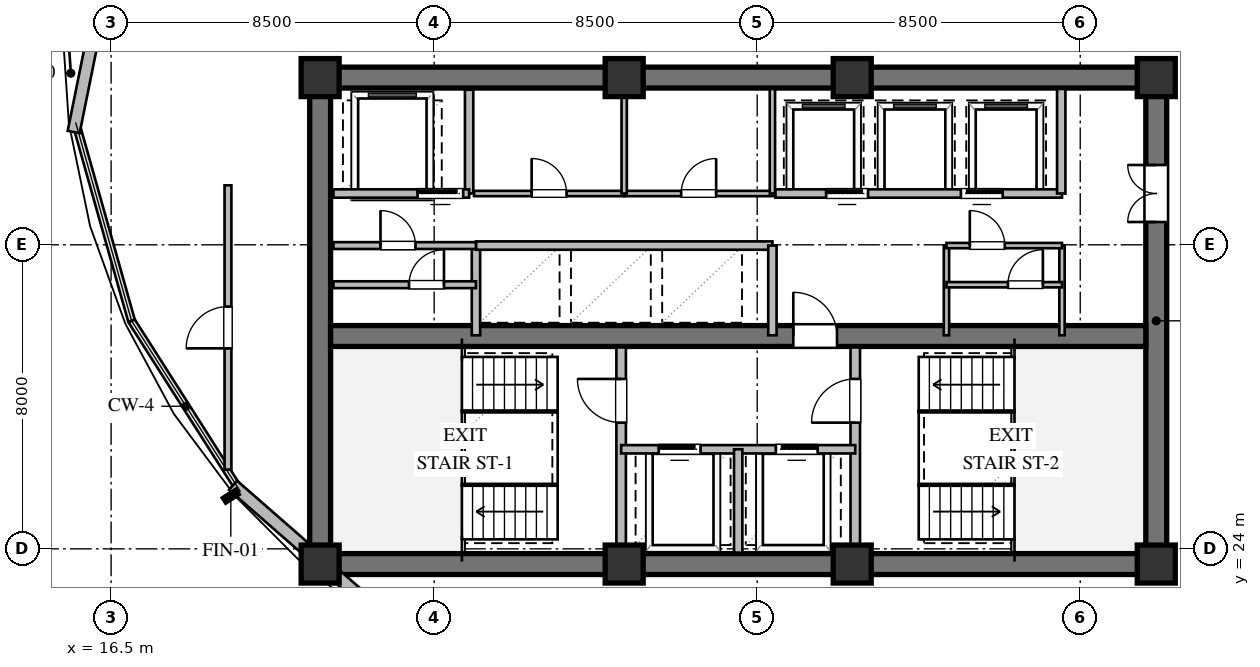
"""IFC4 building model, lengths in metres.
Left out: names, types, materials, properties, quantities, classifications, styles, units other than length and angle.
Written with IfcOpenShell. Run it as: python <this file> out.ifc"""

import sys

from ifc_helpers import new_model, si_unit, direction, frame, frame_2d, origin, origin_2d, place, context, subcontext, project, spatial, rectangle, extrude, element, fill, save


model = new_model("IFC4")
c1 = context("Model", 3, precision=1e-05, world=origin(), true_north=direction((0.0, 1.0)))
c2 = subcontext(c1, "Body", "Model", "MODEL_VIEW")
j1 = project(units=[si_unit("LENGTHUNIT", "METRE"), si_unit("PLANEANGLEUNIT", "RADIAN")], contexts=[c1])
p1 = place(None, origin())
s1 = spatial("IfcSite", under=j1, at=p1, CompositionType="ELEMENT")
p2 = place(p1, origin())
s2 = spatial("IfcBuilding", under=s1, at=p2, CompositionType="ELEMENT")
p3 = place(p2, frame((0.0, 0.0, 109.8)))
s3 = spatial("IfcBuildingStorey", under=s2, at=p3, CompositionType="ELEMENT", Elevation=109.8)
for number, where, z_axis, x_axis in (
    (1, (21.725, 23.6, 0.0), (0.0, 0.0, 1.0), (1.0, 0.0, 0.0)),
    (2, (21.725, 36.4, 0.0), (0.0, 0.0, 1.0), (1.0, 0.0, 0.0)),
):
    element("IfcWall", number, at=place(p3, frame(where, z_axis=z_axis, x_axis=x_axis)), inside=s3, PredefinedType="SHEAR", context=c2, shape_type="SweptSolid", body=[
        extrude(rectangle(XDim=22.55, YDim=0.55, at=frame_2d((11.275, 0.0))), origin(), (0.0, 0.0, 1.0), 3.36),
    ])
p4 = place(p3, frame((22.0, 23.875, 0.0), z_axis=(0.0, 0.0, 1.0), x_axis=(0.0, 1.0, 0.0)))
e3 = element("IfcWall", 3, at=p4, inside=s3, PredefinedType="SHEAR", context=c2, shape_type="SweptSolid", body=[
    extrude(rectangle(XDim=12.25, YDim=0.55, at=frame_2d((6.125, 0.0))), origin(), (0.0, 0.0, 1.0), 3.36),
])
p5 = place(p3, frame((44.0, 23.875, 0.0), z_axis=(0.0, 0.0, 1.0), x_axis=(0.0, 1.0, 0.0)))
e4 = element("IfcWall", 4, at=p5, inside=s3, PredefinedType="SHEAR", context=c2, shape_type="SweptSolid", body=[
    extrude(rectangle(XDim=12.25, YDim=0.55, at=frame_2d((6.125, 0.0))), origin(), (0.0, 0.0, 1.0), 3.36),
])
p6 = place(p5, frame((8.725, 0.0, 0.0)))
e5 = element("IfcOpeningElement", 5, at=p6, cuts=e4, PredefinedType="OPENING", context=c2, shape_type="SweptSolid", body=[
    extrude(rectangle(XDim=1.5, YDim=2.15, at=frame_2d((0.75, 1.075))), frame((0.0, 0.285, 0.0), z_axis=(0.0, -1.0, 0.0), x_axis=(1.0, 0.0, 0.0)), (0.0, 0.0, 1.0), 0.57),
])
p7 = place(p3, frame((22.275, 29.6, 0.0), z_axis=(0.0, 0.0, 1.0), x_axis=(1.0, 0.0, 0.0)))
e6 = element("IfcWall", 6, at=p7, inside=s3, PredefinedType="SHEAR", context=c2, shape_type="SweptSolid", body=[
    extrude(rectangle(XDim=21.45, YDim=0.55, at=frame_2d((10.725, 0.0))), origin(), (0.0, 0.0, 1.0), 3.36),
])
p8 = place(p7, frame((12.175, 0.0, 0.0)))
e7 = element("IfcOpeningElement", 7, at=p8, cuts=e6, PredefinedType="OPENING", context=c2, shape_type="SweptSolid", body=[
    extrude(rectangle(XDim=1.15, YDim=2.1, at=frame_2d((0.575, 1.05))), frame((0.0, 0.285, 0.0), z_axis=(0.0, -1.0, 0.0), x_axis=(1.0, 0.0, 0.0)), (0.0, 0.0, 1.0), 0.57),
])
for number, where, z_axis, x_axis in (
    (8, (22.0, 23.6, 0.0), (0.0, 0.0, 1.0), (1.0, 0.0, 0.0)),
    (9, (30.0, 23.6, 0.0), (0.0, 0.0, 1.0), (1.0, 0.0, 0.0)),
    (10, (36.0, 23.6, 0.0), (0.0, 0.0, 1.0), (1.0, 0.0, 0.0)),
    (11, (44.0, 23.6, 0.0), (0.0, 0.0, 1.0), (1.0, 0.0, 0.0)),
    (12, (44.0, 36.4, 0.0), (0.0, 0.0, 1.0), (1.0, 0.0, 0.0)),
    (13, (36.0, 36.4, 0.0), (0.0, 0.0, 1.0), (1.0, 0.0, 0.0)),
    (14, (30.0, 36.4, 0.0), (0.0, 0.0, 1.0), (1.0, 0.0, 0.0)),
    (15, (22.0, 36.4, 0.0), (0.0, 0.0, 1.0), (1.0, 0.0, 0.0)),
):
    element("IfcColumn", number, at=place(p3, frame(where, z_axis=z_axis, x_axis=x_axis)), inside=s3, PredefinedType="COLUMN", context=c2, shape_type="SweptSolid", body=[
        extrude(rectangle(XDim=1.0, YDim=1.0, at=origin_2d()), origin(), (0.0, 0.0, 1.0), 3.6),
    ])
p9 = place(p3, frame((24.225, 21.727, 0.0), z_axis=(0.0, 0.0, 1.0), x_axis=(-0.753105964003, 0.657899237713, 0.0)))
e16 = element("IfcWall", 16, at=p9, inside=s3, PredefinedType="STANDARD", context=c2, shape_type="SweptSolid", body=[
    extrude(rectangle(XDim=5.998, YDim=0.32, at=frame_2d((2.999, 0.0))), origin(), (0.0, 0.0, 1.0), 2.35),
])
p10 = place(p3, frame((15.514, 34.967, 0.0), z_axis=(0.0, 0.0, 1.0), x_axis=(0.198370893133, 0.980127026848, 0.0)))
e17 = element("IfcWall", 17, at=p10, inside=s3, PredefinedType="STANDARD", context=c2, shape_type="SweptSolid", body=[
    extrude(rectangle(XDim=14.469, YDim=0.32, at=frame_2d((7.234, 0.0))), origin(), (0.0, 0.0, 1.0), 3.36),
])
p11 = place(p3, frame((29.92, 23.9, 0.0), z_axis=(0.0, 0.0, 1.0), x_axis=(0.0, 1.0, 0.0)))
e18 = element("IfcWall", 18, at=p11, inside=s3, PredefinedType="SOLIDWALL", context=c2, shape_type="SweptSolid", body=[
    extrude(rectangle(XDim=5.4, YDim=0.25, at=frame_2d((2.7, 0.0))), origin(), (0.0, 0.0, 1.0), 2.806),
])
p12 = place(p11, frame((3.421, 0.0, 0.0)))
e19 = element("IfcOpeningElement", 19, at=p12, cuts=e18, PredefinedType="OPENING", context=c2, shape_type="SweptSolid", body=[
    extrude(rectangle(XDim=1.15, YDim=2.1, at=frame_2d((0.575, 1.05))), frame((0.0, 0.135, 0.0), z_axis=(0.0, -1.0, 0.0), x_axis=(1.0, 0.0, 0.0)), (0.0, 0.0, 1.0), 0.27),
])
p13 = place(p3, frame((36.08, 23.9, 0.0), z_axis=(0.0, 0.0, 1.0), x_axis=(0.0, 1.0, 0.0)))
e20 = element("IfcWall", 20, at=p13, inside=s3, PredefinedType="SOLIDWALL", context=c2, shape_type="SweptSolid", body=[
    extrude(rectangle(XDim=5.4, YDim=0.25, at=frame_2d((2.7, 0.0))), origin(), (0.0, 0.0, 1.0), 3.36),
])
p14 = place(p13, frame((3.421, 0.0, 0.0)))
e21 = element("IfcOpeningElement", 21, at=p14, cuts=e20, PredefinedType="OPENING", context=c2, shape_type="SweptSolid", body=[
    extrude(rectangle(XDim=1.15, YDim=2.1, at=frame_2d((0.575, 1.05))), frame((0.0, 0.135, 0.0), z_axis=(0.0, -1.0, 0.0), x_axis=(1.0, 0.0, 0.0)), (0.0, 0.0, 1.0), 0.27),
])
p15 = place(p3, frame((29.92, 26.62, 0.0), z_axis=(0.0, 0.0, 1.0), x_axis=(1.0, 0.0, 0.0)))
e22 = element("IfcWall", 22, at=p15, inside=s3, PredefinedType="SOLIDWALL", context=c2, shape_type="SweptSolid", body=[
    extrude(rectangle(XDim=6.16, YDim=0.22, at=frame_2d((3.08, 0.0))), origin(), (0.0, 0.0, 1.0), 3.36),
])
p16 = place(p15, frame((0.99, 0.0, 0.0)))
e23 = element("IfcOpeningElement", 23, at=p16, cuts=e22, PredefinedType="OPENING", context=c2, shape_type="SweptSolid", body=[
    extrude(rectangle(XDim=1.1, YDim=2.1, at=frame_2d((0.55, 1.05))), frame((0.0, 0.12, 0.0), z_axis=(0.0, -1.0, 0.0), x_axis=(1.0, 0.0, 0.0)), (0.0, 0.0, 1.0), 0.24),
])
p17 = place(p15, frame((4.07, 0.0, 0.0)))
e24 = element("IfcOpeningElement", 24, at=p17, cuts=e22, PredefinedType="OPENING", context=c2, shape_type="SweptSolid", body=[
    extrude(rectangle(XDim=1.1, YDim=2.1, at=frame_2d((0.55, 1.05))), frame((0.0, 0.12, 0.0), z_axis=(0.0, -1.0, 0.0), x_axis=(1.0, 0.0, 0.0)), (0.0, 0.0, 1.0), 0.24),
])
p18 = place(p3, frame((33.0, 23.9, 0.0), z_axis=(0.0, 0.0, 1.0), x_axis=(0.0, 1.0, 0.0)))
e25 = element("IfcWall", 25, at=p18, inside=s3, PredefinedType="SOLIDWALL", context=c2, shape_type="SweptSolid", body=[
    extrude(rectangle(XDim=2.72, YDim=0.22, at=frame_2d((1.36, 0.0))), origin(), (0.0, 0.0, 1.0), 3.36),
])
p19 = place(p3, frame((25.92, 33.35, 0.0), z_axis=(0.0, 0.0, 1.0), x_axis=(0.0, 1.0, 0.0)))
e26 = element("IfcWall", 26, at=p19, inside=s3, PredefinedType="SOLIDWALL", context=c2, shape_type="SweptSolid", body=[
    extrude(rectangle(XDim=2.73, YDim=0.22, at=frame_2d((1.365, 0.0))), origin(), (0.0, 0.0, 1.0), 3.36),
])
p20 = place(p3, frame((22.35, 33.35, 0.0), z_axis=(0.0, 0.0, 1.0), x_axis=(1.0, 0.0, 0.0)))
e27 = element("IfcWall", 27, at=p20, inside=s3, PredefinedType="SOLIDWALL", context=c2, shape_type="SweptSolid", body=[
    extrude(rectangle(XDim=3.57, YDim=0.22, at=frame_2d((1.785, 0.0))), origin(), (0.0, 0.0, 1.0), 3.36),
])
p21 = place(p20, frame((2.213, 0.0, 0.0)))
e28 = element("IfcOpeningElement", 28, at=p21, cuts=e27, PredefinedType="OPENING", context=c2, shape_type="SweptSolid", body=[
    extrude(rectangle(XDim=1.2, YDim=2.1, at=frame_2d((0.6, 1.05))), frame((0.0, 0.12, 0.0), z_axis=(0.0, -1.0, 0.0), x_axis=(1.0, 0.0, 0.0)), (0.0, 0.0, 1.0), 0.24),
])
p22 = place(p3, frame((26.1, 29.62, 0.0), z_axis=(0.0, 0.0, 1.0), x_axis=(0.0, 1.0, 0.0)))
e29 = element("IfcWall", 29, at=p22, inside=s3, PredefinedType="SOLIDWALL", context=c2, shape_type="SweptSolid", body=[
    extrude(rectangle(XDim=2.36, YDim=0.22, at=frame_2d((1.18, 0.0))), origin(), (0.0, 0.0, 1.0), 3.36),
])
p23 = place(p3, frame((26.1, 31.98, 0.0), z_axis=(0.0, 0.0, 1.0), x_axis=(1.0, 0.0, 0.0)))
e30 = element("IfcWall", 30, at=p23, inside=s3, PredefinedType="SOLIDWALL", context=c2, shape_type="SweptSolid", body=[
    extrude(rectangle(XDim=7.8, YDim=0.22, at=frame_2d((3.9, 0.0))), origin(), (0.0, 0.0, 1.0), 3.36),
])
p24 = place(p3, frame((33.9, 29.62, 0.0), z_axis=(0.0, 0.0, 1.0), x_axis=(0.0, 1.0, 0.0)))
e31 = element("IfcWall", 31, at=p24, inside=s3, PredefinedType="SOLIDWALL", context=c2, shape_type="SweptSolid", body=[
    extrude(rectangle(XDim=2.36, YDim=0.22, at=frame_2d((1.18, 0.0))), origin(), (0.0, 0.0, 1.0), 3.36),
])
p25 = place(p3, frame((26.05, 33.35, 0.0), z_axis=(0.0, 0.0, 1.0), x_axis=(1.0, 0.0, 0.0)))
e32 = element("IfcWall", 32, at=p25, inside=s3, PredefinedType="PARTITIONING", context=c2, shape_type="SweptSolid", body=[
    extrude(rectangle(XDim=3.95, YDim=0.14, at=frame_2d((1.975, 0.0))), origin(), (0.0, 0.0, 1.0), 3.36),
])
p26 = place(p25, frame((1.515, 0.0, 0.0)))
e33 = element("IfcOpeningElement", 33, at=p26, cuts=e32, PredefinedType="OPENING", context=c2, shape_type="SweptSolid", body=[
    extrude(rectangle(XDim=0.92, YDim=2.1, at=frame_2d((0.46, 1.05))), frame((0.0, 0.08, 0.0), z_axis=(0.0, -1.0, 0.0), x_axis=(1.0, 0.0, 0.0)), (0.0, 0.0, 1.0), 0.16),
])
p27 = place(p3, frame((30.0, 33.35, 0.0), z_axis=(0.0, 0.0, 1.0), x_axis=(1.0, 0.0, 0.0)))
e34 = element("IfcWall", 34, at=p27, inside=s3, PredefinedType="PARTITIONING", context=c2, shape_type="SweptSolid", body=[
    extrude(rectangle(XDim=3.92, YDim=0.14, at=frame_2d((1.96, 0.0))), origin(), (0.0, 0.0, 1.0), 3.36),
])
p28 = place(p27, frame((1.5, 0.0, 0.0)))
e35 = element("IfcOpeningElement", 35, at=p28, cuts=e34, PredefinedType="OPENING", context=c2, shape_type="SweptSolid", body=[
    extrude(rectangle(XDim=0.92, YDim=2.1, at=frame_2d((0.46, 1.05))), frame((0.0, 0.08, 0.0), z_axis=(0.0, -1.0, 0.0), x_axis=(1.0, 0.0, 0.0)), (0.0, 0.0, 1.0), 0.16),
])
for number, where, z_axis, x_axis in (
    (36, (30.0, 33.35, 0.0), (0.0, 0.0, 1.0), (0.0, 1.0, 0.0)),
    (37, (33.9, 33.35, 0.0), (0.0, 0.0, 1.0), (0.0, 1.0, 0.0)),
):
    element("IfcWall", number, at=place(p3, frame(where, z_axis=z_axis, x_axis=x_axis)), inside=s3, PredefinedType="PARTITIONING", context=c2, shape_type="SweptSolid", body=[
        extrude(rectangle(XDim=2.75, YDim=0.14, at=frame_2d((1.375, 0.0))), origin(), (0.0, 0.0, 1.0), 3.36),
    ])
p29 = place(p3, frame((33.98, 33.35, 0.0), z_axis=(0.0, 0.0, 1.0), x_axis=(1.0, 0.0, 0.0)))
e38 = element("IfcWall", 38, at=p29, inside=s3, PredefinedType="SOLIDWALL", context=c2, shape_type="SweptSolid", body=[
    extrude(rectangle(XDim=7.54, YDim=0.22, at=frame_2d((3.77, 0.0))), origin(), (0.0, 0.0, 1.0), 3.36),
])
p30 = place(p29, frame((1.335, 0.0, 0.0)))
e39 = element("IfcOpeningElement", 39, at=p30, cuts=e38, PredefinedType="OPENING", context=c2, shape_type="SweptSolid", body=[
    extrude(rectangle(XDim=1.1, YDim=2.1, at=frame_2d((0.55, 1.05))), frame((0.0, 0.12, 0.0), z_axis=(0.0, -1.0, 0.0), x_axis=(1.0, 0.0, 0.0)), (0.0, 0.0, 1.0), 0.24),
])
p31 = place(p29, frame((4.879, 0.0, 0.0)))
e40 = element("IfcOpeningElement", 40, at=p31, cuts=e38, PredefinedType="OPENING", context=c2, shape_type="SweptSolid", body=[
    extrude(rectangle(XDim=1.1, YDim=2.1, at=frame_2d((0.55, 1.05))), frame((0.0, 0.12, 0.0), z_axis=(0.0, -1.0, 0.0), x_axis=(1.0, 0.0, 0.0)), (0.0, 0.0, 1.0), 0.24),
])
p32 = place(p3, frame((41.5, 33.35, 0.0), z_axis=(0.0, 0.0, 1.0), x_axis=(0.0, 1.0, 0.0)))
e41 = element("IfcWall", 41, at=p32, inside=s3, PredefinedType="SOLIDWALL", context=c2, shape_type="SweptSolid", body=[
    extrude(rectangle(XDim=2.75, YDim=0.22, at=frame_2d((1.375, 0.0))), origin(), (0.0, 0.0, 1.0), 3.36),
])
p33 = place(p3, frame((22.35, 30.95, 0.0), z_axis=(0.0, 0.0, 1.0), x_axis=(1.0, 0.0, 0.0)))
e42 = element("IfcWall", 42, at=p33, inside=s3, PredefinedType="PARTITIONING", context=c2, shape_type="SweptSolid", body=[
    extrude(rectangle(XDim=3.75, YDim=0.18, at=frame_2d((1.875, 0.0))), origin(), (0.0, 0.0, 1.0), 3.36),
])
p34 = place(p33, frame((1.988, 0.0, 0.0)))
e43 = element("IfcOpeningElement", 43, at=p34, cuts=e42, PredefinedType="OPENING", context=c2, shape_type="SweptSolid", body=[
    extrude(rectangle(XDim=0.92, YDim=2.1, at=frame_2d((0.46, 1.05))), frame((0.0, 0.1, 0.0), z_axis=(0.0, -1.0, 0.0), x_axis=(1.0, 0.0, 0.0)), (0.0, 0.0, 1.0), 0.2),
])
p35 = place(p3, frame((22.35, 31.98, 0.0), z_axis=(0.0, 0.0, 1.0), x_axis=(1.0, 0.0, 0.0)))
e44 = element("IfcWall", 44, at=p35, inside=s3, PredefinedType="PARTITIONING", context=c2, shape_type="SweptSolid", body=[
    extrude(rectangle(XDim=3.75, YDim=0.18, at=frame_2d((1.875, 0.0))), origin(), (0.0, 0.0, 1.0), 3.36),
])
p36 = place(p35, frame((1.238, 0.0, 0.0)))
e45 = element("IfcOpeningElement", 45, at=p36, cuts=e44, PredefinedType="OPENING", context=c2, shape_type="SweptSolid", body=[
    extrude(rectangle(XDim=0.92, YDim=2.1, at=frame_2d((0.46, 1.05))), frame((0.0, 0.1, 0.0), z_axis=(0.0, -1.0, 0.0), x_axis=(1.0, 0.0, 0.0)), (0.0, 0.0, 1.0), 0.2),
])
for number, where, z_axis, x_axis in (
    (46, (38.48, 29.62, 0.0), (0.0, 0.0, 1.0), (0.0, 1.0, 0.0)),
    (47, (41.52, 29.62, 0.0), (0.0, 0.0, 1.0), (0.0, 1.0, 0.0)),
):
    element("IfcWall", number, at=place(p3, frame(where, z_axis=z_axis, x_axis=x_axis)), inside=s3, PredefinedType="PARTITIONING", context=c2, shape_type="SweptSolid", body=[
        extrude(rectangle(XDim=2.36, YDim=0.14, at=frame_2d((1.18, 0.0))), origin(), (0.0, 0.0, 1.0), 3.36),
    ])
p37 = place(p3, frame((38.48, 30.95, 0.0), z_axis=(0.0, 0.0, 1.0), x_axis=(1.0, 0.0, 0.0)))
e48 = element("IfcWall", 48, at=p37, inside=s3, PredefinedType="PARTITIONING", context=c2, shape_type="SweptSolid", body=[
    extrude(rectangle(XDim=3.04, YDim=0.14, at=frame_2d((1.52, 0.0))), origin(), (0.0, 0.0, 1.0), 3.36),
])
p38 = place(p37, frame((1.617, 0.0, 0.0)))
e49 = element("IfcOpeningElement", 49, at=p38, cuts=e48, PredefinedType="OPENING", context=c2, shape_type="SweptSolid", body=[
    extrude(rectangle(XDim=0.92, YDim=2.1, at=frame_2d((0.46, 1.05))), frame((0.0, 0.08, 0.0), z_axis=(0.0, -1.0, 0.0), x_axis=(1.0, 0.0, 0.0)), (0.0, 0.0, 1.0), 0.16),
])
p39 = place(p3, frame((38.48, 31.98, 0.0), z_axis=(0.0, 0.0, 1.0), x_axis=(1.0, 0.0, 0.0)))
e50 = element("IfcWall", 50, at=p39, inside=s3, PredefinedType="PARTITIONING", context=c2, shape_type="SweptSolid", body=[
    extrude(rectangle(XDim=3.04, YDim=0.14, at=frame_2d((1.52, 0.0))), origin(), (0.0, 0.0, 1.0), 3.36),
])
p40 = place(p39, frame((0.614, 0.0, 0.0)))
e51 = element("IfcOpeningElement", 51, at=p40, cuts=e50, PredefinedType="OPENING", context=c2, shape_type="SweptSolid", body=[
    extrude(rectangle(XDim=0.92, YDim=2.1, at=frame_2d((0.46, 1.05))), frame((0.0, 0.08, 0.0), z_axis=(0.0, -1.0, 0.0), x_axis=(1.0, 0.0, 0.0)), (0.0, 0.0, 1.0), 0.16),
])
p41 = place(p3, frame((19.575, 26.085, 0.0), z_axis=(0.0, 0.0, 1.0), x_axis=(0.0, 1.0, 0.0)))
e52 = element("IfcWall", 52, at=p41, inside=s3, PredefinedType="PARTITIONING", context=c2, shape_type="SweptSolid", body=[
    extrude(rectangle(XDim=7.48, YDim=0.18, at=frame_2d((3.74, 0.0))), origin(), (0.0, 0.0, 1.0), 2.657),
])
p42 = place(p41, frame((3.19, 0.0, 0.0)))
e53 = element("IfcOpeningElement", 53, at=p42, cuts=e52, PredefinedType="OPENING", context=c2, shape_type="SweptSolid", body=[
    extrude(rectangle(XDim=1.1, YDim=2.1, at=frame_2d((0.55, 1.05))), frame((0.0, 0.1, 0.0), z_axis=(0.0, -1.0, 0.0), x_axis=(1.0, 0.0, 0.0)), (0.0, 0.0, 1.0), 0.2),
])
p43 = place(p12, origin())
e54 = element("IfcDoor", 54, at=p43, inside=s3, OperationType="SINGLE_SWING_RIGHT", PredefinedType="DOOR", context=c2, shape_type="SweptSolid", body=[
    extrude(rectangle(XDim=1.15, YDim=2.1, at=frame_2d((0.575, 1.05))), frame((0.0, 0.025, 0.0), z_axis=(0.0, -1.0, 0.0), x_axis=(1.0, 0.0, 0.0)), (0.0, 0.0, 1.0), 0.05),
])
fill(e19, e54)
p44 = place(p14, origin())
e55 = element("IfcDoor", 55, at=p44, inside=s3, OperationType="SINGLE_SWING_LEFT", PredefinedType="DOOR", context=c2, shape_type="SweptSolid", body=[
    extrude(rectangle(XDim=1.15, YDim=2.1, at=frame_2d((0.575, 1.05))), frame((0.0, 0.025, 0.0), z_axis=(0.0, -1.0, 0.0), x_axis=(1.0, 0.0, 0.0)), (0.0, 0.0, 1.0), 0.05),
])
fill(e21, e55)
p45 = place(p16, origin())
e56 = element("IfcDoor", 56, at=p45, inside=s3, OperationType="SLIDING_TO_LEFT", PredefinedType="DOOR", context=c2, shape_type="SweptSolid", body=[
    extrude(rectangle(XDim=1.1, YDim=2.1, at=frame_2d((0.55, 1.05))), frame((0.0, 0.025, 0.0), z_axis=(0.0, -1.0, 0.0), x_axis=(1.0, 0.0, 0.0)), (0.0, 0.0, 1.0), 0.05),
])
fill(e23, e56)
p46 = place(p17, origin())
e57 = element("IfcDoor", 57, at=p46, inside=s3, OperationType="SLIDING_TO_RIGHT", PredefinedType="DOOR", context=c2, shape_type="SweptSolid", body=[
    extrude(rectangle(XDim=1.1, YDim=2.1, at=frame_2d((0.55, 1.05))), frame((0.0, 0.025, 0.0), z_axis=(0.0, -1.0, 0.0), x_axis=(1.0, 0.0, 0.0)), (0.0, 0.0, 1.0), 0.05),
])
fill(e24, e57)
p47 = place(p8, origin())
e58 = element("IfcDoor", 58, at=p47, inside=s3, OperationType="SINGLE_SWING_LEFT", PredefinedType="DOOR", context=c2, shape_type="SweptSolid", body=[
    extrude(rectangle(XDim=1.15, YDim=2.1, at=frame_2d((0.575, 1.05))), frame((0.0, 0.025, 0.0), z_axis=(0.0, -1.0, 0.0), x_axis=(1.0, 0.0, 0.0)), (0.0, 0.0, 1.0), 0.05),
])
fill(e7, e58)
p48 = place(p6, origin())
e59 = element("IfcDoor", 59, at=p48, inside=s3, OperationType="DOUBLE_DOOR_SINGLE_SWING", PredefinedType="DOOR", context=c2, shape_type="SweptSolid", body=[
    extrude(rectangle(XDim=1.5, YDim=2.15, at=frame_2d((0.75, 1.075))), frame((0.0, 0.025, 0.0), z_axis=(0.0, -1.0, 0.0), x_axis=(1.0, 0.0, 0.0)), (0.0, 0.0, 1.0), 0.05),
])
fill(e5, e59)
p49 = place(p21, origin())
e60 = element("IfcDoor", 60, at=p49, inside=s3, OperationType="SLIDING_TO_LEFT", PredefinedType="DOOR", context=c2, shape_type="SweptSolid", body=[
    extrude(rectangle(XDim=1.2, YDim=2.1, at=frame_2d((0.6, 1.05))), frame((0.0, 0.025, 0.0), z_axis=(0.0, -1.0, 0.0), x_axis=(1.0, 0.0, 0.0)), (0.0, 0.0, 1.0), 0.05),
])
fill(e28, e60)
p50 = place(p26, origin())
e61 = element("IfcDoor", 61, at=p50, inside=s3, OperationType="SINGLE_SWING_LEFT", PredefinedType="DOOR", context=c2, shape_type="SweptSolid", body=[
    extrude(rectangle(XDim=0.92, YDim=2.1, at=frame_2d((0.46, 1.05))), frame((0.0, 0.025, 0.0), z_axis=(0.0, -1.0, 0.0), x_axis=(1.0, 0.0, 0.0)), (0.0, 0.0, 1.0), 0.05),
])
fill(e33, e61)
p51 = place(p28, origin())
e62 = element("IfcDoor", 62, at=p51, inside=s3, OperationType="SINGLE_SWING_RIGHT", PredefinedType="DOOR", context=c2, shape_type="SweptSolid", body=[
    extrude(rectangle(XDim=0.92, YDim=2.1, at=frame_2d((0.46, 1.05))), frame((0.0, 0.025, 0.0), z_axis=(0.0, -1.0, 0.0), x_axis=(1.0, 0.0, 0.0)), (0.0, 0.0, 1.0), 0.05),
])
fill(e35, e62)
p52 = place(p30, origin())
e63 = element("IfcDoor", 63, at=p52, inside=s3, OperationType="SLIDING_TO_LEFT", PredefinedType="DOOR", context=c2, shape_type="SweptSolid", body=[
    extrude(rectangle(XDim=1.1, YDim=2.1, at=frame_2d((0.55, 1.05))), frame((0.0, 0.025, 0.0), z_axis=(0.0, -1.0, 0.0), x_axis=(1.0, 0.0, 0.0)), (0.0, 0.0, 1.0), 0.05),
])
fill(e39, e63)
p53 = place(p31, origin())
e64 = element("IfcDoor", 64, at=p53, inside=s3, OperationType="SLIDING_TO_RIGHT", PredefinedType="DOOR", context=c2, shape_type="SweptSolid", body=[
    extrude(rectangle(XDim=1.1, YDim=2.1, at=frame_2d((0.55, 1.05))), frame((0.0, 0.025, 0.0), z_axis=(0.0, -1.0, 0.0), x_axis=(1.0, 0.0, 0.0)), (0.0, 0.0, 1.0), 0.05),
])
fill(e40, e64)
p54 = place(p36, origin())
e65 = element("IfcDoor", 65, at=p54, inside=s3, OperationType="SINGLE_SWING_LEFT", PredefinedType="DOOR", context=c2, shape_type="SweptSolid", body=[
    extrude(rectangle(XDim=0.92, YDim=2.1, at=frame_2d((0.46, 1.05))), frame((0.0, 0.025, 0.0), z_axis=(0.0, -1.0, 0.0), x_axis=(1.0, 0.0, 0.0)), (0.0, 0.0, 1.0), 0.05),
])
fill(e45, e65)
p55 = place(p34, origin())
e66 = element("IfcDoor", 66, at=p55, inside=s3, OperationType="SINGLE_SWING_RIGHT", PredefinedType="DOOR", context=c2, shape_type="SweptSolid", body=[
    extrude(rectangle(XDim=0.92, YDim=2.1, at=frame_2d((0.46, 1.05))), frame((0.0, 0.025, 0.0), z_axis=(0.0, -1.0, 0.0), x_axis=(1.0, 0.0, 0.0)), (0.0, 0.0, 1.0), 0.05),
])
fill(e43, e66)
p56 = place(p40, origin())
e67 = element("IfcDoor", 67, at=p56, inside=s3, OperationType="SINGLE_SWING_LEFT", PredefinedType="DOOR", context=c2, shape_type="SweptSolid", body=[
    extrude(rectangle(XDim=0.92, YDim=2.1, at=frame_2d((0.46, 1.05))), frame((0.0, 0.025, 0.0), z_axis=(0.0, -1.0, 0.0), x_axis=(1.0, 0.0, 0.0)), (0.0, 0.0, 1.0), 0.05),
])
fill(e51, e67)
p57 = place(p38, origin())
e68 = element("IfcDoor", 68, at=p57, inside=s3, OperationType="SINGLE_SWING_RIGHT", PredefinedType="DOOR", context=c2, shape_type="SweptSolid", body=[
    extrude(rectangle(XDim=0.92, YDim=2.1, at=frame_2d((0.46, 1.05))), frame((0.0, 0.025, 0.0), z_axis=(0.0, -1.0, 0.0), x_axis=(1.0, 0.0, 0.0)), (0.0, 0.0, 1.0), 0.05),
])
fill(e49, e68)
p58 = place(p42, origin())
e69 = element("IfcDoor", 69, at=p58, inside=s3, OperationType="SINGLE_SWING_LEFT", PredefinedType="DOOR", context=c2, shape_type="SweptSolid", body=[
    extrude(rectangle(XDim=1.1, YDim=2.1, at=frame_2d((0.55, 1.05))), frame((0.0, 0.025, 0.0), z_axis=(0.0, -1.0, 0.0), x_axis=(1.0, 0.0, 0.0)), (0.0, 0.0, 1.0), 0.05),
])
fill(e53, e69)
save(model, sys.argv[1])
